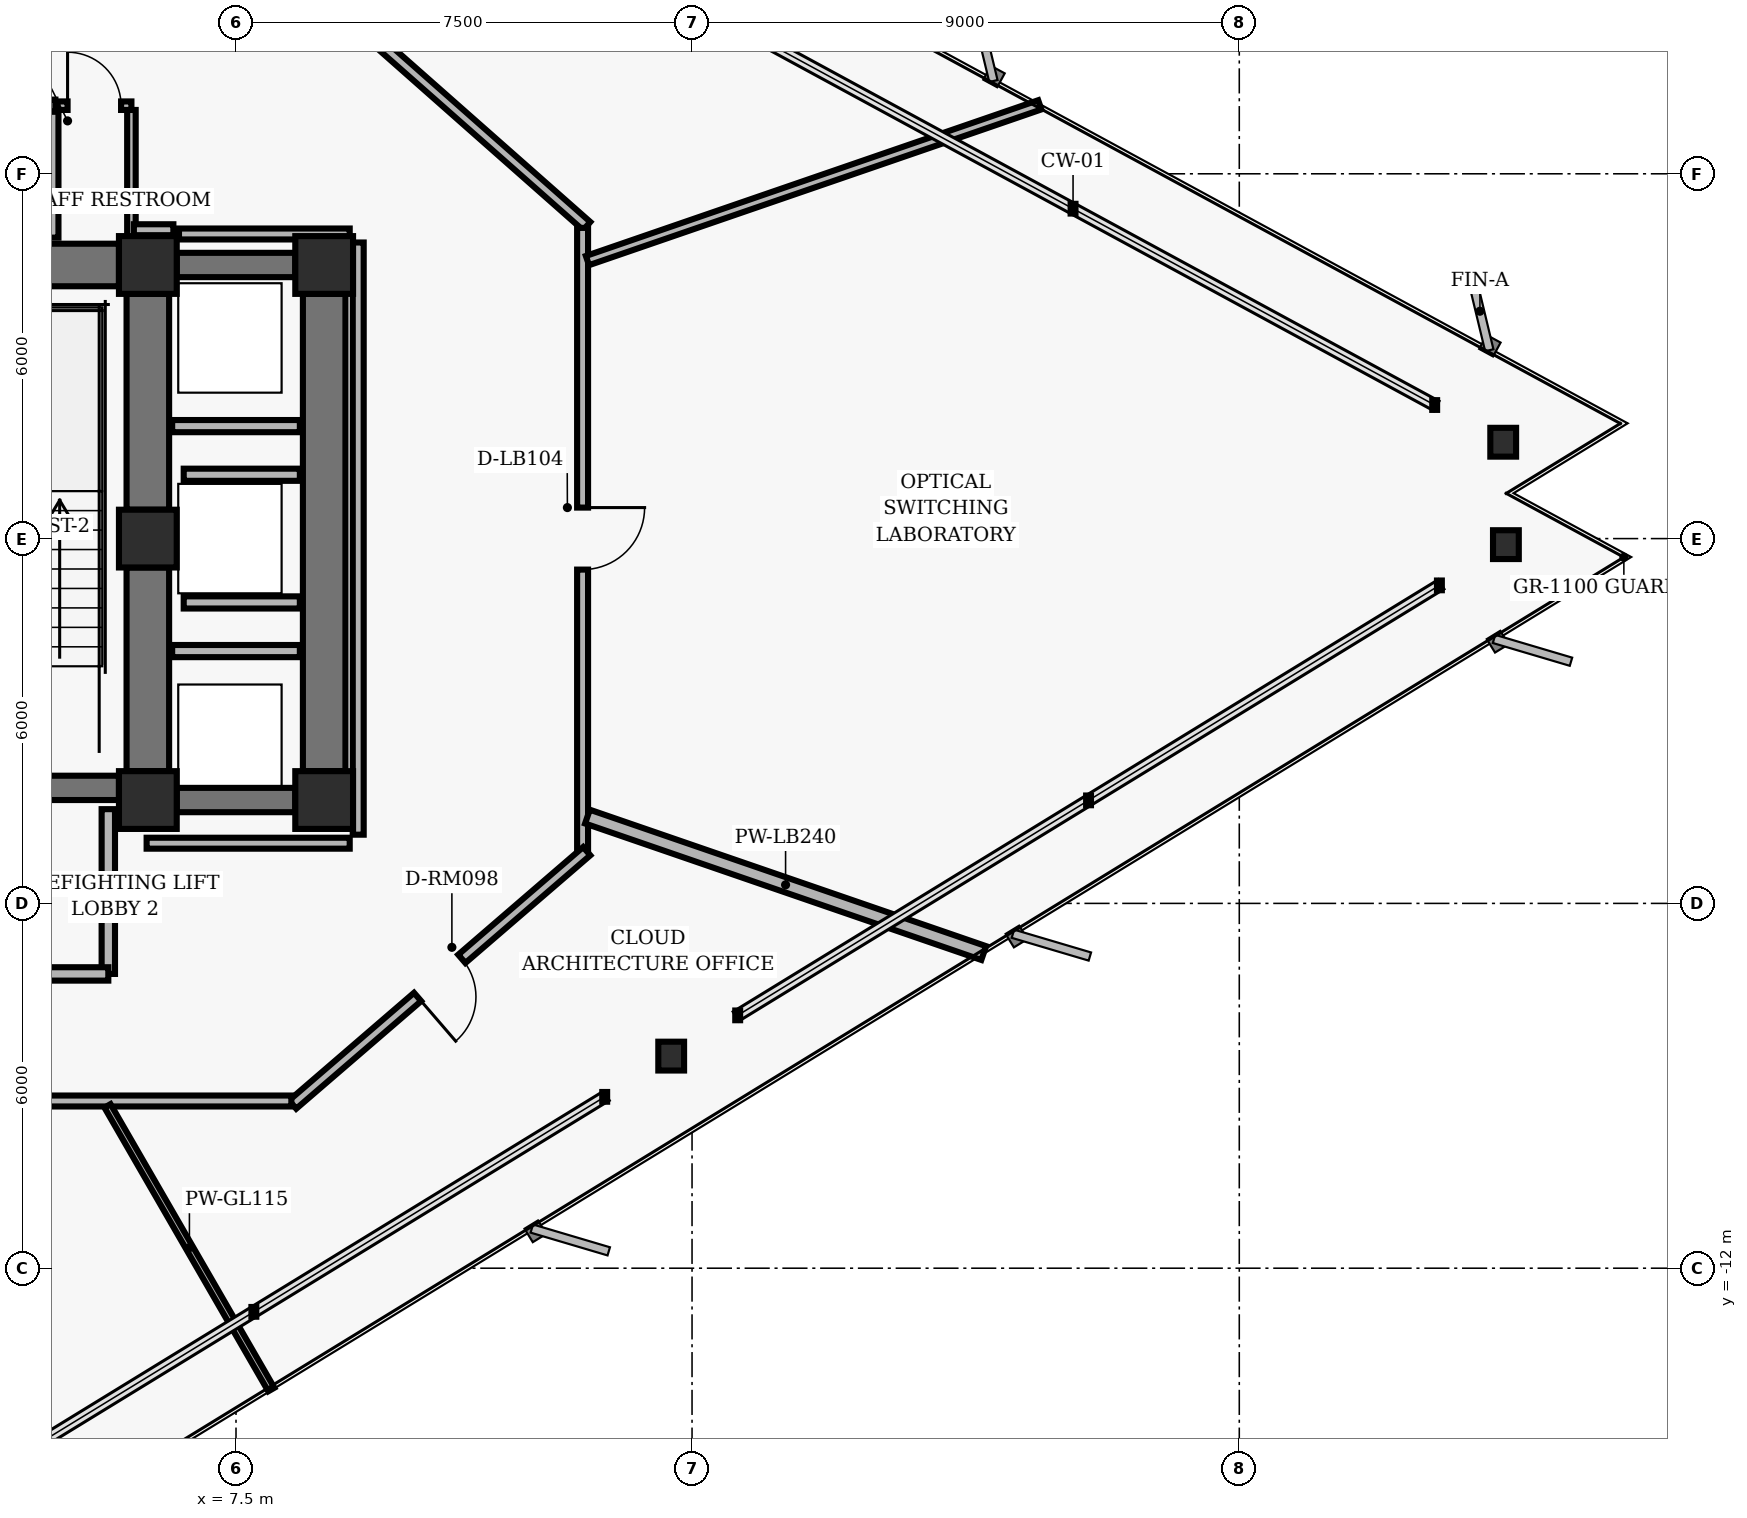
"""IFC4 building model, lengths in metres.
Left out: names, types, materials, properties, quantities, classifications, styles, units other than length and angle.
Written with IfcOpenShell. Run it as: python <this file> out.ifc"""

import sys

from ifc_helpers import new_model, si_unit, direction, frame, frame_2d, origin, origin_2d, place, context, subcontext, project, spatial, rectangle, hollow_rectangle, i_section, extrude, element, fill, save


model = new_model("IFC4")
c1 = context("Model", 3, precision=1e-05, world=origin(), true_north=direction((0.0, 1.0)))
c2 = subcontext(c1, "Body", "Model", "MODEL_VIEW")
j1 = project(units=[si_unit("LENGTHUNIT", "METRE"), si_unit("PLANEANGLEUNIT", "RADIAN")], contexts=[c1])
p1 = place(None, origin())
s1 = spatial("IfcSite", under=j1, at=p1, CompositionType="ELEMENT")
p2 = place(p1, origin())
s2 = spatial("IfcBuilding", under=s1, at=p2, CompositionType="ELEMENT")
p3 = place(p2, frame((0.0, 0.0, 42.4)))
s3 = spatial("IfcBuildingStorey", under=s2, at=p3, CompositionType="ELEMENT", Elevation=42.4)
for number, where, z_axis, x_axis in (
    (1, (6.05, 4.5, 0.0), (0.0, 0.0, 1.0), (1.0, 0.0, 0.0)),
    (2, (6.05, 0.0, 0.0), (0.0, 0.0, 1.0), (1.0, 0.0, 0.0)),
    (3, (6.05, -4.3, 0.0), (0.0, 0.0, 1.0), (1.0, 0.0, 0.0)),
    (4, (8.95, 4.5, 0.0), (0.0, 0.0, 1.0), (1.0, 0.0, 0.0)),
    (5, (8.95, -4.3, 0.0), (0.0, 0.0, 1.0), (1.0, 0.0, 0.0)),
):
    element("IfcColumn", number, at=place(p3, frame(where, z_axis=z_axis, x_axis=x_axis)), inside=s3, PredefinedType="COLUMN", context=c2, shape_type="SweptSolid", body=[
        extrude(hollow_rectangle(XDim=0.95, YDim=0.95, WallThickness=0.06, InnerFilletRadius=0.02, OuterFilletRadius=0.04, at=origin_2d()), origin(), (0.0, 0.0, 1.0), 3.36),
    ])
p4 = place(p3, frame((6.05, 0.475, 0.0), z_axis=(0.0, 0.0, 1.0), x_axis=(0.0, 1.0, 0.0)))
e6 = element("IfcWall", 6, at=p4, inside=s3, PredefinedType="SHEAR", context=c2, shape_type="SweptSolid", body=[
    extrude(rectangle(XDim=3.55, YDim=0.7, at=frame_2d((1.775, 0.0))), origin(), (0.0, 0.0, 1.0), 3.038),
])
p5 = place(p3, frame((6.05, -3.825, 0.0), z_axis=(0.0, 0.0, 1.0), x_axis=(0.0, 1.0, 0.0)))
e7 = element("IfcWall", 7, at=p5, inside=s3, PredefinedType="SHEAR", context=c2, shape_type="SweptSolid", body=[
    extrude(rectangle(XDim=3.35, YDim=0.7, at=frame_2d((1.675, 0.0))), origin(), (0.0, 0.0, 1.0), 3.038),
])
p6 = place(p3, frame((-5.575, -4.1, 0.0), z_axis=(0.0, 0.0, 1.0), x_axis=(1.0, 0.0, 0.0)))
e8 = element("IfcWall", 8, at=p6, inside=s3, PredefinedType="SHEAR", context=c2, shape_type="SweptSolid", body=[
    extrude(rectangle(XDim=11.15, YDim=0.4, at=frame_2d((5.575, 0.0))), origin(), (0.0, 0.0, 1.0), 3.038),
])
p7 = place(p6, frame((1.305, 0.0, 0.0)))
e9 = element("IfcOpeningElement", 9, at=p7, cuts=e8, PredefinedType="OPENING", context=c2, shape_type="SweptSolid", body=[
    extrude(rectangle(XDim=1.1, YDim=2.04, at=frame_2d((0.55, 1.02))), frame((0.0, 0.21, 0.0), z_axis=(0.0, -1.0, 0.0), x_axis=(1.0, 0.0, 0.0)), (0.0, 0.0, 1.0), 0.42),
])
p8 = place(p6, frame((8.745, 0.0, 0.0)))
e10 = element("IfcOpeningElement", 10, at=p8, cuts=e8, PredefinedType="OPENING", context=c2, shape_type="SweptSolid", body=[
    extrude(rectangle(XDim=1.1, YDim=2.04, at=frame_2d((0.55, 1.02))), frame((0.0, 0.21, 0.0), z_axis=(0.0, -1.0, 0.0), x_axis=(1.0, 0.0, 0.0)), (0.0, 0.0, 1.0), 0.42),
])
p9 = place(p6, frame((4.045, 0.0, 0.0)))
e11 = element("IfcOpeningElement", 11, at=p9, cuts=e8, PredefinedType="OPENING", context=c2, shape_type="SweptSolid", body=[
    extrude(rectangle(XDim=1.06, YDim=2.04, at=frame_2d((0.53, 1.02))), frame((0.0, 0.21, 0.0), z_axis=(0.0, -1.0, 0.0), x_axis=(1.0, 0.0, 0.0)), (0.0, 0.0, 1.0), 0.42),
])
p10 = place(p6, frame((6.045, 0.0, 0.0)))
e12 = element("IfcOpeningElement", 12, at=p10, cuts=e8, PredefinedType="OPENING", context=c2, shape_type="SweptSolid", body=[
    extrude(rectangle(XDim=1.06, YDim=2.04, at=frame_2d((0.53, 1.02))), frame((0.0, 0.21, 0.0), z_axis=(0.0, -1.0, 0.0), x_axis=(1.0, 0.0, 0.0)), (0.0, 0.0, 1.0), 0.42),
])
p11 = place(p3, frame((2.05, 4.5, 0.0), z_axis=(0.0, 0.0, 1.0), x_axis=(1.0, 0.0, 0.0)))
e13 = element("IfcWall", 13, at=p11, inside=s3, PredefinedType="SHEAR", context=c2, shape_type="SweptSolid", body=[
    extrude(rectangle(XDim=3.525, YDim=0.7, at=frame_2d((1.762, 0.0))), origin(), (0.0, 0.0, 1.0), 3.038),
])
p12 = place(p3, frame((8.95, -3.825, 0.0), z_axis=(0.0, 0.0, 1.0), x_axis=(0.0, 1.0, 0.0)))
e14 = element("IfcWall", 14, at=p12, inside=s3, PredefinedType="SHEAR", context=c2, shape_type="SweptSolid", body=[
    extrude(rectangle(XDim=7.85, YDim=0.7, at=frame_2d((3.925, 0.0))), origin(), (0.0, 0.0, 1.0), 3.038),
])
for number, where, z_axis, x_axis in (
    (15, (6.525, 4.5, 0.0), (0.0, 0.0, 1.0), (1.0, 0.0, 0.0)),
    (16, (6.525, -4.3, 0.0), (0.0, 0.0, 1.0), (1.0, 0.0, 0.0)),
):
    element("IfcWall", number, at=place(p3, frame(where, z_axis=z_axis, x_axis=x_axis)), inside=s3, PredefinedType="SHEAR", context=c2, shape_type="SweptSolid", body=[
        extrude(rectangle(XDim=1.95, YDim=0.4, at=frame_2d((0.975, 0.0))), origin(), (0.0, 0.0, 1.0), 3.038),
    ])
for number, where, z_axis, x_axis in (
    (17, (28.341, 1.585, 0.0), (0.0, 0.0, 1.0), (1.0, 0.0, 0.0)),
    (18, (14.657, -8.512, 0.0), (0.0, 0.0, 1.0), (1.0, 0.0, 0.0)),
    (19, (28.385, -0.1, 0.0), (0.0, 0.0, 1.0), (1.0, 0.0, 0.0)),
):
    element("IfcColumn", number, at=place(p3, frame(where, z_axis=z_axis, x_axis=x_axis)), inside=s3, PredefinedType="COLUMN", context=c2, shape_type="SweptSolid", body=[
        extrude(i_section(OverallWidth=0.424, OverallDepth=0.474, WebThickness=0.048, FlangeThickness=0.077, FilletRadius=0.025, at=origin_2d()), origin(), (0.0, 0.0, 1.0), 3.36),
    ])
p13 = place(p3, frame((5.4, -7.16, 0.0), z_axis=(0.0, 0.0, 1.0), x_axis=(0.0, 1.0, 0.0)))
e20 = element("IfcWall", 20, at=p13, inside=s3, PredefinedType="PARTITIONING", context=c2, shape_type="SweptSolid", body=[
    extrude(rectangle(XDim=2.71, YDim=0.22, at=frame_2d((1.355, 0.0))), origin(), (0.0, 0.0, 1.0), 3.013),
])
p14 = place(p3, frame((0.0, -7.16, 0.0), z_axis=(0.0, 0.0, 1.0), x_axis=(1.0, 0.0, 0.0)))
e21 = element("IfcWall", 21, at=p14, inside=s3, PredefinedType="PARTITIONING", context=c2, shape_type="SweptSolid", body=[
    extrude(rectangle(XDim=5.4, YDim=0.22, at=frame_2d((2.7, 0.0))), origin(), (0.0, 0.0, 1.0), 3.013),
])
p15 = place(p14, frame((2.05, 0.0, 0.0)))
e22 = element("IfcOpeningElement", 22, at=p15, cuts=e21, PredefinedType="OPENING", context=c2, shape_type="SweptSolid", body=[
    extrude(rectangle(XDim=1.12, YDim=2.02, at=frame_2d((0.56, 1.01))), frame((0.0, 0.12, 0.0), z_axis=(0.0, -1.0, 0.0), x_axis=(1.0, 0.0, 0.0)), (0.0, 0.0, 1.0), 0.24),
])
p16 = place(p3, frame((4.48, 4.95, 0.0), z_axis=(0.0, 0.0, 1.0), x_axis=(0.0, 1.0, 0.0)))
e23 = element("IfcWall", 23, at=p16, inside=s3, PredefinedType="PARTITIONING", context=c2, shape_type="SweptSolid", body=[
    extrude(rectangle(XDim=2.1, YDim=0.2, at=frame_2d((1.05, 0.0))), origin(), (0.0, 0.0, 1.0), 3.013),
])
p17 = place(p3, frame((2.15, 7.12, 0.0), z_axis=(0.0, 0.0, 1.0), x_axis=(1.0, 0.0, 0.0)))
e24 = element("IfcWall", 24, at=p17, inside=s3, PredefinedType="PARTITIONING", context=c2, shape_type="SweptSolid", body=[
    extrude(rectangle(XDim=2.38, YDim=0.2, at=frame_2d((1.19, 0.0))), origin(), (0.0, 0.0, 1.0), 3.013),
])
p18 = place(p17, frame((0.56, 0.0, 0.0)))
e25 = element("IfcOpeningElement", 25, at=p18, cuts=e24, PredefinedType="OPENING", context=c2, shape_type="SweptSolid", body=[
    extrude(rectangle(XDim=1.26, YDim=2.06, at=frame_2d((0.63, 1.03))), frame((0.0, 0.11, 0.0), z_axis=(0.0, -1.0, 0.0), x_axis=(1.0, 0.0, 0.0)), (0.0, 0.0, 1.0), 0.22),
])
p19 = place(p3, frame((5.78, 4.95, 0.0), z_axis=(0.0, 0.0, 1.0), x_axis=(0.0, 1.0, 0.0)))
e26 = element("IfcWall", 26, at=p19, inside=s3, PredefinedType="PARTITIONING", context=c2, shape_type="SweptSolid", body=[
    extrude(rectangle(XDim=2.1, YDim=0.14, at=frame_2d((1.05, 0.0))), origin(), (0.0, 0.0, 1.0), 3.013),
])
p20 = place(p3, frame((4.56, 7.12, 0.0), z_axis=(0.0, 0.0, 1.0), x_axis=(1.0, 0.0, 0.0)))
e27 = element("IfcWall", 27, at=p20, inside=s3, PredefinedType="PARTITIONING", context=c2, shape_type="SweptSolid", body=[
    extrude(rectangle(XDim=1.22, YDim=0.14, at=frame_2d((0.61, 0.0))), origin(), (0.0, 0.0, 1.0), 3.013),
])
p21 = place(p20, frame((0.17, 0.0, 0.0)))
e28 = element("IfcOpeningElement", 28, at=p21, cuts=e27, PredefinedType="OPENING", context=c2, shape_type="SweptSolid", body=[
    extrude(rectangle(XDim=0.88, YDim=2.02, at=frame_2d((0.44, 1.01))), frame((0.0, 0.08, 0.0), z_axis=(0.0, -1.0, 0.0), x_axis=(1.0, 0.0, 0.0)), (0.0, 0.0, 1.0), 0.16),
])
for number, where, z_axis, x_axis in (
    (29, (6.45, -1.85, 0.0), (0.0, 0.0, 1.0), (1.0, 0.0, 0.0)),
    (30, (6.45, 1.85, 0.0), (0.0, 0.0, 1.0), (1.0, 0.0, 0.0)),
):
    element("IfcWall", number, at=place(p3, frame(where, z_axis=z_axis, x_axis=x_axis)), inside=s3, PredefinedType="PARTITIONING", context=c2, shape_type="SweptSolid", body=[
        extrude(rectangle(XDim=2.1, YDim=0.2, at=frame_2d((1.05, 0.0))), origin(), (0.0, 0.0, 1.0), 3.013),
    ])
for number, where, z_axis, x_axis in (
    (31, (6.64, -1.05, 0.0), (0.0, 0.0, 1.0), (1.0, 0.0, 0.0)),
    (32, (6.64, 1.05, 0.0), (0.0, 0.0, 1.0), (1.0, 0.0, 0.0)),
):
    element("IfcWall", number, at=place(p3, frame(where, z_axis=z_axis, x_axis=x_axis)), inside=s3, PredefinedType="PARTITIONING", context=c2, shape_type="SweptSolid", body=[
        extrude(rectangle(XDim=1.91, YDim=0.2, at=frame_2d((0.955, 0.0))), origin(), (0.0, 0.0, 1.0), 3.013),
    ])
p22 = place(p3, frame((8.567, 9.29, 0.0), z_axis=(0.0, 0.0, 1.0), x_axis=(0.749626463267, -0.66186113768, 0.0)))
e33 = element("IfcWall", 33, at=p22, inside=s3, PredefinedType="PARTITIONING", context=c2, shape_type="SweptSolid", body=[
    extrude(rectangle(XDim=6.27, YDim=0.18, at=frame_2d((3.135, 0.0))), origin(), (0.0, 0.0, 1.0), 2.527),
])
p23 = place(p3, frame((13.2, 5.11, 0.0), z_axis=(0.0, 0.0, 1.0), x_axis=(0.0, -1.0, 0.0)))
e34 = element("IfcWall", 34, at=p23, inside=s3, PredefinedType="PARTITIONING", context=c2, shape_type="SweptSolid", body=[
    extrude(rectangle(XDim=10.22, YDim=0.18, at=frame_2d((5.11, 0.0))), origin(), (0.0, 0.0, 1.0), 3.013),
])
p24 = place(p23, frame((4.6, 0.0, 0.0)))
e35 = element("IfcOpeningElement", 35, at=p24, cuts=e34, PredefinedType="OPENING", context=c2, shape_type="SweptSolid", body=[
    extrude(rectangle(XDim=1.02, YDim=2.02, at=frame_2d((0.51, 1.01))), frame((0.0, 0.1, 0.0), z_axis=(0.0, -1.0, 0.0), x_axis=(1.0, 0.0, 0.0)), (0.0, 0.0, 1.0), 0.2),
])
p25 = place(p3, frame((13.268, -5.141, 0.0), z_axis=(0.0, 0.0, 1.0), x_axis=(-0.757534501725, -0.65279512766, 0.0)))
e36 = element("IfcWall", 36, at=p25, inside=s3, PredefinedType="PARTITIONING", context=c2, shape_type="SweptSolid", body=[
    extrude(rectangle(XDim=6.385, YDim=0.18, at=frame_2d((3.192, 0.0))), origin(), (0.0, 0.0, 1.0), 2.527),
])
p26 = place(p25, frame((2.712, 0.0, 0.0)))
e37 = element("IfcOpeningElement", 37, at=p26, cuts=e36, PredefinedType="OPENING", context=c2, shape_type="SweptSolid", body=[
    extrude(rectangle(XDim=0.96, YDim=2.02, at=frame_2d((0.48, 1.01))), frame((0.0, 0.1, 0.0), z_axis=(0.0, -1.0, 0.0), x_axis=(1.0, 0.0, 0.0)), (0.0, 0.0, 1.0), 0.2),
])
p27 = place(p3, frame((8.41, -9.25, 0.0), z_axis=(0.0, 0.0, 1.0), x_axis=(-1.0, 0.0, 0.0)))
e38 = element("IfcWall", 38, at=p27, inside=s3, PredefinedType="PARTITIONING", context=c2, shape_type="SweptSolid", body=[
    extrude(rectangle(XDim=17.0, YDim=0.18, at=frame_2d((8.5, 0.0))), origin(), (0.0, 0.0, 1.0), 2.527),
])
p28 = place(p27, frame((9.399, 0.0, 0.0)))
e39 = element("IfcOpeningElement", 39, at=p28, cuts=e38, PredefinedType="OPENING", context=c2, shape_type="SweptSolid", body=[
    extrude(rectangle(XDim=0.96, YDim=2.02, at=frame_2d((0.48, 1.01))), frame((0.0, 0.1, 0.0), z_axis=(0.0, -1.0, 0.0), x_axis=(1.0, 0.0, 0.0)), (0.0, 0.0, 1.0), 0.2),
])
p29 = place(p3, frame((6.03, -5.01, 0.0), z_axis=(0.0, 0.0, 1.0), x_axis=(1.0, 0.0, 0.0)))
e40 = element("IfcWall", 40, at=p29, inside=s3, PredefinedType="PARTITIONING", context=c2, shape_type="SweptSolid", body=[
    extrude(rectangle(XDim=3.34, YDim=0.18, at=frame_2d((1.67, 0.0))), origin(), (0.0, 0.0, 1.0), 3.013),
])
p30 = place(p3, frame((9.51, -4.87, 0.0), z_axis=(0.0, 0.0, 1.0), x_axis=(0.0, 1.0, 0.0)))
e41 = element("IfcWall", 41, at=p30, inside=s3, PredefinedType="PARTITIONING", context=c2, shape_type="SweptSolid", body=[
    extrude(rectangle(XDim=9.74, YDim=0.18, at=frame_2d((4.87, 0.0))), origin(), (0.0, 0.0, 1.0), 3.013),
])
p31 = place(p3, frame((9.37, 5.01, 0.0), z_axis=(0.0, 0.0, 1.0), x_axis=(-1.0, 0.0, 0.0)))
e42 = element("IfcWall", 42, at=p31, inside=s3, PredefinedType="PARTITIONING", context=c2, shape_type="SweptSolid", body=[
    extrude(rectangle(XDim=2.808, YDim=0.18, at=frame_2d((1.404, 0.0))), origin(), (0.0, 0.0, 1.0), 3.013),
])
p32 = place(p3, frame((6.47, 5.08, 0.0), z_axis=(0.0, 0.0, 1.0), x_axis=(-1.0, 0.0, 0.0)))
e43 = element("IfcWall", 43, at=p32, inside=s3, PredefinedType="PARTITIONING", context=c2, shape_type="SweptSolid", body=[
    extrude(rectangle(XDim=0.65, YDim=0.18, at=frame_2d((0.325, 0.0))), origin(), (0.0, 0.0, 1.0), 3.013),
])
p33 = place(p3, frame((5.387, -9.33, 0.0), z_axis=(0.0, 0.0, 1.0), x_axis=(0.500023165436, -0.866012028801, 0.0)))
e44 = element("IfcWall", 44, at=p33, inside=s3, PredefinedType="MOVABLE", context=c2, shape_type="SweptSolid", body=[
    extrude(rectangle(XDim=5.388, YDim=0.115, at=frame_2d((2.694, 0.0))), origin(), (0.0, 0.0, 1.0), 3.013),
])
p34 = place(p3, frame((13.28, -4.573, 0.0), z_axis=(0.0, 0.0, 1.0), x_axis=(0.945516314602, -0.325574720797, 0.0)))
e45 = element("IfcWall", 45, at=p34, inside=s3, PredefinedType="PARTITIONING", context=c2, shape_type="SweptSolid", body=[
    extrude(rectangle(XDim=6.892, YDim=0.24, at=frame_2d((3.446, 0.0))), origin(), (0.0, 0.0, 1.0), 3.013),
])
p35 = place(p3, frame((13.28, 4.573, 0.0), z_axis=(0.0, 0.0, 1.0), x_axis=(0.94552490271, 0.325549778613, 0.0)))
e46 = element("IfcWall", 46, at=p35, inside=s3, PredefinedType="PARTITIONING", context=c2, shape_type="SweptSolid", body=[
    extrude(rectangle(XDim=7.867, YDim=0.16, at=frame_2d((3.934, 0.0))), origin(), (0.0, 0.0, 1.0), 3.013),
])
p36 = place(p21, origin())
e47 = element("IfcDoor", 47, at=p36, inside=s3, OperationType="SINGLE_SWING_LEFT", PredefinedType="DOOR", context=c2, shape_type="SweptSolid", body=[
    extrude(rectangle(XDim=0.88, YDim=2.02, at=frame_2d((0.44, 1.01))), frame((0.0, 0.025, 0.0), z_axis=(0.0, -1.0, 0.0), x_axis=(1.0, 0.0, 0.0)), (0.0, 0.0, 1.0), 0.05),
])
fill(e28, e47)
p37 = place(p26, origin())
e48 = element("IfcDoor", 48, at=p37, inside=s3, OperationType="SINGLE_SWING_RIGHT", PredefinedType="DOOR", context=c2, shape_type="SweptSolid", body=[
    extrude(rectangle(XDim=0.96, YDim=2.02, at=frame_2d((0.48, 1.01))), frame((0.0, 0.025, 0.0), z_axis=(0.0, -1.0, 0.0), x_axis=(1.0, 0.0, 0.0)), (0.0, 0.0, 1.0), 0.05),
])
fill(e37, e48)
p38 = place(p24, origin())
e49 = element("IfcDoor", 49, at=p38, inside=s3, OperationType="SINGLE_SWING_LEFT", PredefinedType="DOOR", context=c2, shape_type="SweptSolid", body=[
    extrude(rectangle(XDim=1.02, YDim=2.02, at=frame_2d((0.51, 1.01))), frame((0.0, 0.025, 0.0), z_axis=(0.0, -1.0, 0.0), x_axis=(1.0, 0.0, 0.0)), (0.0, 0.0, 1.0), 0.05),
])
fill(e35, e49)
save(model, sys.argv[1])
